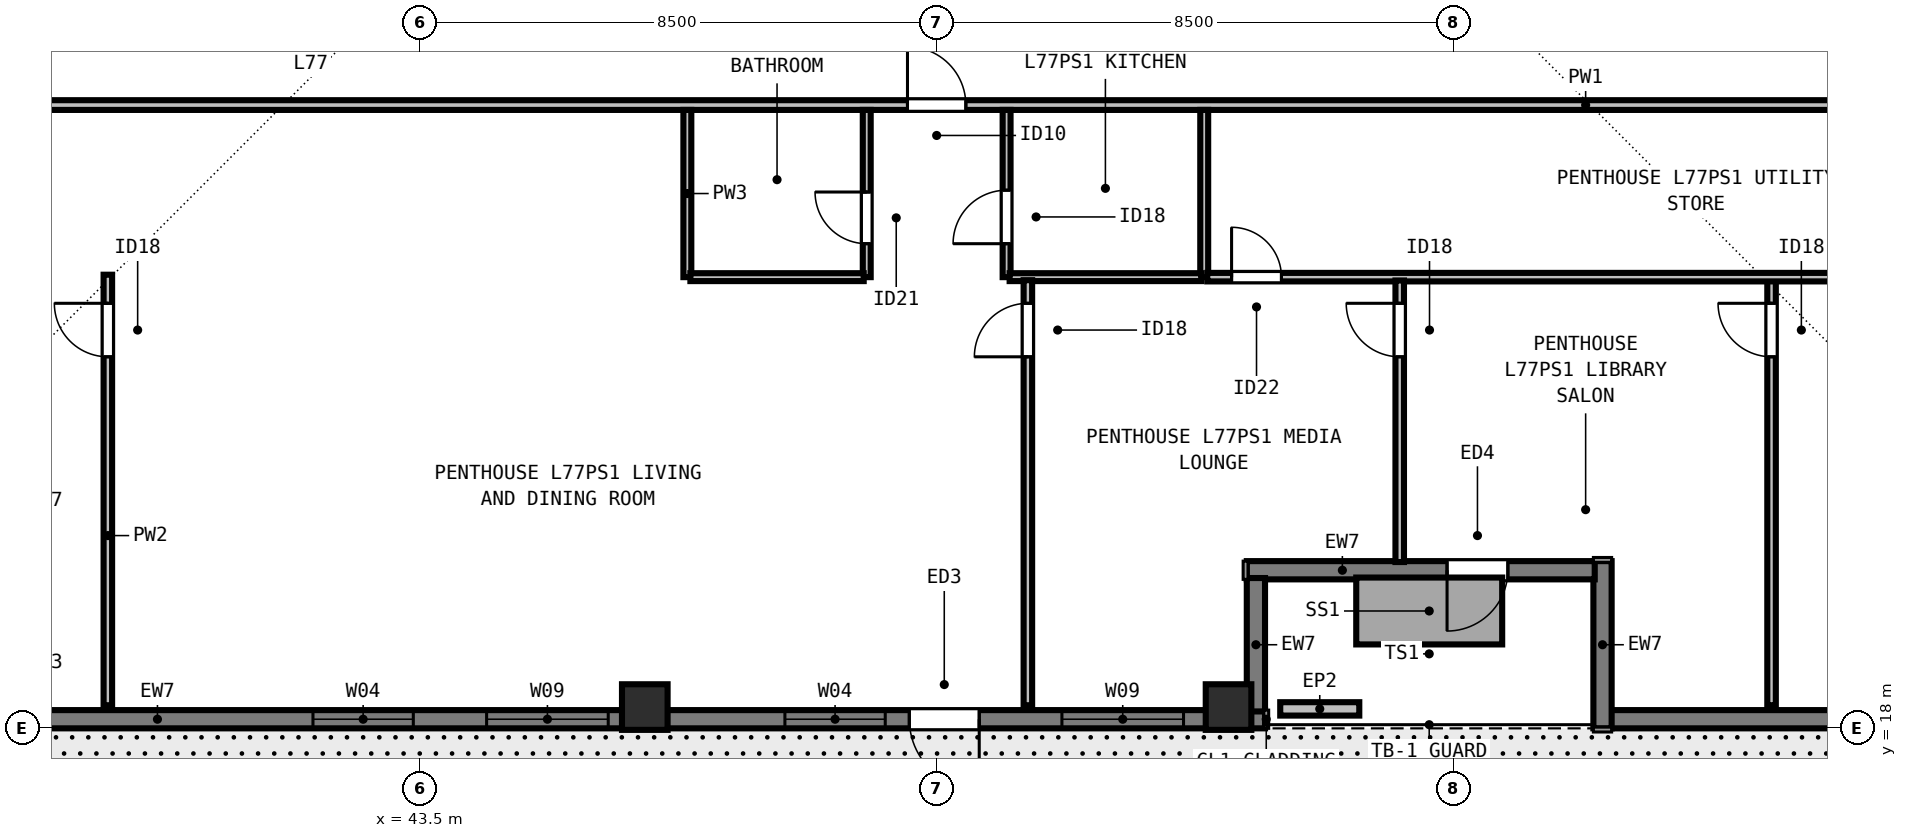
"""IFC4 building model, lengths in metres.
Left out: names, types, materials, properties, quantities, classifications, styles, units other than length and angle.
Written with IfcOpenShell. Run it as: python <this file> out.ifc"""

import sys

from ifc_helpers import new_model, si_unit, direction, frame, frame_2d, origin, origin_2d, place, context, subcontext, project, spatial, rectangle, extrude, element, fill, save


model = new_model("IFC4")
c1 = context("Model", 3, precision=1e-05, world=origin(), true_north=direction((0.0, 1.0)))
c2 = subcontext(c1, "Body", "Model", "MODEL_VIEW")
j1 = project(units=[si_unit("LENGTHUNIT", "METRE"), si_unit("PLANEANGLEUNIT", "RADIAN")], contexts=[c1])
p1 = place(None, origin())
s1 = spatial("IfcSite", under=j1, at=p1, CompositionType="ELEMENT")
p2 = place(p1, origin())
s2 = spatial("IfcBuilding", under=s1, at=p2, CompositionType="ELEMENT")
p3 = place(p2, frame((0.0, 0.0, 280.5)))
s3 = spatial("IfcBuildingStorey", under=s2, at=p3, CompositionType="ELEMENT", Elevation=280.5)
for number, where, z_axis, x_axis in (
    (1, (47.2, 18.35, 0.0), (0.0, 0.0, 1.0), (1.0, 0.0, 0.0)),
    (2, (56.8, 18.35, 0.0), (0.0, 0.0, 1.0), (1.0, 0.0, 0.0)),
):
    element("IfcColumn", number, at=place(p3, frame(where, z_axis=z_axis, x_axis=x_axis)), inside=s3, PredefinedType="COLUMN", context=c2, shape_type="SweptSolid", body=[
        extrude(rectangle(XDim=0.75, YDim=0.75, at=origin_2d()), origin(), (0.0, 0.0, 1.0), 3.5),
    ])
p4 = place(p3, frame((57.4, 18.15, 0.0), z_axis=(0.0, 0.0, 1.0), x_axis=(-1.0, 0.0, 0.0)))
e3 = element("IfcWall", 3, at=p4, inside=s3, PredefinedType="SOLIDWALL", context=c2, shape_type="SweptSolid", body=[
    extrude(rectangle(XDim=20.622, YDim=0.3, at=frame_2d((10.311, 0.0))), origin(), (0.0, 0.0, 1.0), 3.29),
])
p5 = place(p4, frame((1.34, 0.0, 0.8)))
e4 = element("IfcOpeningElement", 4, at=p5, cuts=e3, PredefinedType="OPENING", context=c2, shape_type="SweptSolid", body=[
    extrude(rectangle(XDim=2.0, YDim=1.758, at=frame_2d((1.0, 0.879))), frame((0.0, 0.16, 0.0), z_axis=(0.0, -1.0, 0.0), x_axis=(1.0, 0.0, 0.0)), (0.0, 0.0, 1.0), 0.32),
])
p6 = place(p4, frame((6.246, 0.0, 0.8)))
e5 = element("IfcOpeningElement", 5, at=p6, cuts=e3, PredefinedType="OPENING", context=c2, shape_type="SweptSolid", body=[
    extrude(rectangle(XDim=1.65, YDim=1.758, at=frame_2d((0.825, 0.879))), frame((0.0, 0.16, 0.0), z_axis=(0.0, -1.0, 0.0), x_axis=(1.0, 0.0, 0.0)), (0.0, 0.0, 1.0), 0.32),
])
p7 = place(p4, frame((10.801, 0.0, 0.8)))
e6 = element("IfcOpeningElement", 6, at=p7, cuts=e3, PredefinedType="OPENING", context=c2, shape_type="SweptSolid", body=[
    extrude(rectangle(XDim=2.0, YDim=1.758, at=frame_2d((1.0, 0.879))), frame((0.0, 0.16, 0.0), z_axis=(0.0, -1.0, 0.0), x_axis=(1.0, 0.0, 0.0)), (0.0, 0.0, 1.0), 0.32),
])
p8 = place(p4, frame((14.007, 0.0, 0.8)))
e7 = element("IfcOpeningElement", 7, at=p8, cuts=e3, PredefinedType="OPENING", context=c2, shape_type="SweptSolid", body=[
    extrude(rectangle(XDim=1.65, YDim=1.758, at=frame_2d((0.825, 0.879))), frame((0.0, 0.16, 0.0), z_axis=(0.0, -1.0, 0.0), x_axis=(1.0, 0.0, 0.0)), (0.0, 0.0, 1.0), 0.32),
])
p9 = place(p4, frame((4.7, 0.0, 0.0)))
e8 = element("IfcOpeningElement", 8, at=p9, cuts=e3, PredefinedType="OPENING", context=c2, shape_type="SweptSolid", body=[
    extrude(rectangle(XDim=1.15, YDim=2.15, at=frame_2d((0.575, 1.075))), frame((0.0, 0.16, 0.0), z_axis=(0.0, -1.0, 0.0), x_axis=(1.0, 0.0, 0.0)), (0.0, 0.0, 1.0), 0.32),
])
p10 = place(p3, frame((67.5, 18.15, 0.0), z_axis=(0.0, 0.0, 1.0), x_axis=(-1.0, 0.0, 0.0)))
e9 = element("IfcWall", 9, at=p10, inside=s3, PredefinedType="SOLIDWALL", context=c2, shape_type="SweptSolid", body=[
    extrude(rectangle(XDim=4.422, YDim=0.3, at=frame_2d((2.211, 0.0))), origin(), (0.0, 0.0, 1.0), 3.29),
])
p11 = place(p3, frame((62.95, 18.0, 0.0), z_axis=(0.0, 0.0, 1.0), x_axis=(0.0, 1.0, 0.0)))
e10 = element("IfcWall", 10, at=p11, inside=s3, PredefinedType="SOLIDWALL", context=c2, shape_type="SweptSolid", body=[
    extrude(rectangle(XDim=2.75, YDim=0.3, at=frame_2d((1.375, 0.0))), origin(), (0.0, 0.0, 1.0), 3.29),
])
p12 = place(p3, frame((62.822, 20.6, 0.0), z_axis=(0.0, 0.0, 1.0), x_axis=(-1.0, 0.0, 0.0)))
e11 = element("IfcWall", 11, at=p12, inside=s3, PredefinedType="SOLIDWALL", context=c2, shape_type="SweptSolid", body=[
    extrude(rectangle(XDim=5.722, YDim=0.3, at=frame_2d((2.861, 0.0))), origin(), (0.0, 0.0, 1.0), 3.29),
])
p13 = place(p12, frame((1.428, 0.0, 0.0)))
e12 = element("IfcOpeningElement", 12, at=p13, cuts=e11, PredefinedType="OPENING", context=c2, shape_type="SweptSolid", body=[
    extrude(rectangle(XDim=1.0, YDim=2.15, at=frame_2d((0.5, 1.075))), frame((0.0, 0.16, 0.0), z_axis=(0.0, -1.0, 0.0), x_axis=(1.0, 0.0, 0.0)), (0.0, 0.0, 1.0), 0.32),
])
p14 = place(p3, frame((57.25, 20.472, 0.0), z_axis=(0.0, 0.0, 1.0), x_axis=(0.0, -1.0, 0.0)))
e13 = element("IfcWall", 13, at=p14, inside=s3, PredefinedType="SOLIDWALL", context=c2, shape_type="SweptSolid", body=[
    extrude(rectangle(XDim=2.194, YDim=0.3, at=frame_2d((1.097, 0.0))), origin(), (0.0, 0.0, 1.0), 3.29),
])
p15 = place(p3, frame((57.65, 18.32, 0.0), z_axis=(0.0, 0.0, 1.0), x_axis=(1.0, 0.0, 0.0)))
e14 = element("IfcWall", 14, at=p15, inside=s3, PredefinedType="PARAPET", context=c2, shape_type="SweptSolid", body=[
    extrude(rectangle(XDim=1.3, YDim=0.22, at=frame_2d((0.65, 0.0))), origin(), (0.0, 0.0, 1.0), 0.55),
])
p16 = place(p3, frame((31.285, 28.25, 0.0), z_axis=(0.0, 0.0, 1.0), x_axis=(1.0, 0.0, 0.0)))
e15 = element("IfcWall", 15, at=p16, inside=s3, PredefinedType="PARTITIONING", context=c2, shape_type="SweptSolid", body=[
    extrude(rectangle(XDim=41.43, YDim=0.16, at=frame_2d((20.715, 0.0))), origin(), (0.0, 0.0, 1.0), 3.009),
])
p17 = place(p16, frame((20.235, 0.0, 0.0)))
e16 = element("IfcOpeningElement", 16, at=p17, cuts=e15, PredefinedType="OPENING", context=c2, shape_type="SweptSolid", body=[
    extrude(rectangle(XDim=0.96, YDim=2.18, at=frame_2d((0.48, 1.09))), frame((0.0, 0.09, 0.0), z_axis=(0.0, -1.0, 0.0), x_axis=(1.0, 0.0, 0.0)), (0.0, 0.0, 1.0), 0.18),
])
p18 = place(p3, frame((47.9, 25.42, 0.0), z_axis=(0.0, 0.0, 1.0), x_axis=(0.0, 1.0, 0.0)))
e17 = element("IfcWall", 17, at=p18, inside=s3, PredefinedType="PLUMBINGWALL", context=c2, shape_type="SweptSolid", body=[
    extrude(rectangle(XDim=2.75, YDim=0.13, at=frame_2d((1.375, 0.0))), origin(), (0.0, 0.0, 1.0), 3.29),
])
p19 = place(p3, frame((50.85, 25.42, 0.0), z_axis=(0.0, 0.0, 1.0), x_axis=(0.0, 1.0, 0.0)))
e18 = element("IfcWall", 18, at=p19, inside=s3, PredefinedType="PLUMBINGWALL", context=c2, shape_type="SweptSolid", body=[
    extrude(rectangle(XDim=2.75, YDim=0.13, at=frame_2d((1.375, 0.0))), origin(), (0.0, 0.0, 1.0), 3.29),
])
p20 = place(p19, frame((0.55, 0.0, 0.0)))
e19 = element("IfcOpeningElement", 19, at=p20, cuts=e18, PredefinedType="OPENING", context=c2, shape_type="SweptSolid", body=[
    extrude(rectangle(XDim=0.85, YDim=2.08, at=frame_2d((0.425, 1.04))), frame((0.0, 0.075, 0.0), z_axis=(0.0, -1.0, 0.0), x_axis=(1.0, 0.0, 0.0)), (0.0, 0.0, 1.0), 0.15),
])
p21 = place(p3, frame((47.95, 25.42, 0.0), z_axis=(0.0, 0.0, 1.0), x_axis=(1.0, 0.0, 0.0)))
e20 = element("IfcWall", 20, at=p21, inside=s3, PredefinedType="PLUMBINGWALL", context=c2, shape_type="SweptSolid", body=[
    extrude(rectangle(XDim=2.85, YDim=0.13, at=frame_2d((1.425, 0.0))), origin(), (0.0, 0.0, 1.0), 3.29),
])
p22 = place(p3, frame((56.4, 25.42, 0.0), z_axis=(0.0, 0.0, 1.0), x_axis=(0.0, 1.0, 0.0)))
e21 = element("IfcWall", 21, at=p22, inside=s3, PredefinedType="PLUMBINGWALL", context=c2, shape_type="SweptSolid", body=[
    extrude(rectangle(XDim=2.75, YDim=0.13, at=frame_2d((1.375, 0.0))), origin(), (0.0, 0.0, 1.0), 3.29),
])
p23 = place(p3, frame((53.15, 25.42, 0.0), z_axis=(0.0, 0.0, 1.0), x_axis=(0.0, 1.0, 0.0)))
e22 = element("IfcWall", 22, at=p23, inside=s3, PredefinedType="PLUMBINGWALL", context=c2, shape_type="SweptSolid", body=[
    extrude(rectangle(XDim=2.75, YDim=0.13, at=frame_2d((1.375, 0.0))), origin(), (0.0, 0.0, 1.0), 3.009),
])
p24 = place(p23, frame((0.55, 0.0, 0.0)))
e23 = element("IfcOpeningElement", 23, at=p24, cuts=e22, PredefinedType="OPENING", context=c2, shape_type="SweptSolid", body=[
    extrude(rectangle(XDim=0.88, YDim=2.1, at=frame_2d((0.44, 1.05))), frame((0.0, 0.075, 0.0), z_axis=(0.0, -1.0, 0.0), x_axis=(1.0, 0.0, 0.0)), (0.0, 0.0, 1.0), 0.15),
])
p25 = place(p3, frame((53.2, 25.42, 0.0), z_axis=(0.0, 0.0, 1.0), x_axis=(1.0, 0.0, 0.0)))
e24 = element("IfcWall", 24, at=p25, inside=s3, PredefinedType="PLUMBINGWALL", context=c2, shape_type="SweptSolid", body=[
    extrude(rectangle(XDim=3.15, YDim=0.13, at=frame_2d((1.575, 0.0))), origin(), (0.0, 0.0, 1.0), 3.29),
])
p26 = place(p3, frame((38.37, 18.38, 0.0), z_axis=(0.0, 0.0, 1.0), x_axis=(0.0, 1.0, 0.0)))
e25 = element("IfcWall", 25, at=p26, inside=s3, PredefinedType="PARTITIONING", context=c2, shape_type="SweptSolid", body=[
    extrude(rectangle(XDim=7.08, YDim=0.14, at=frame_2d((3.54, 0.0))), origin(), (0.0, 0.0, 1.0), 2.653),
])
p27 = place(p26, frame((5.73, 0.0, 0.0)))
e26 = element("IfcOpeningElement", 26, at=p27, cuts=e25, PredefinedType="OPENING", context=c2, shape_type="SweptSolid", body=[
    extrude(rectangle(XDim=0.88, YDim=2.1, at=frame_2d((0.44, 1.05))), frame((0.0, 0.08, 0.0), z_axis=(0.0, -1.0, 0.0), x_axis=(1.0, 0.0, 0.0)), (0.0, 0.0, 1.0), 0.16),
])
p28 = place(p3, frame((65.73, 18.38, 0.0), z_axis=(0.0, 0.0, 1.0), x_axis=(0.0, 1.0, 0.0)))
e27 = element("IfcWall", 27, at=p28, inside=s3, PredefinedType="PARTITIONING", context=c2, shape_type="SweptSolid", body=[
    extrude(rectangle(XDim=7.08, YDim=0.14, at=frame_2d((3.54, 0.0))), origin(), (0.0, 0.0, 1.0), 2.653),
])
p29 = place(p28, frame((5.73, 0.0, 0.0)))
e28 = element("IfcOpeningElement", 28, at=p29, cuts=e27, PredefinedType="OPENING", context=c2, shape_type="SweptSolid", body=[
    extrude(rectangle(XDim=0.88, YDim=2.1, at=frame_2d((0.44, 1.05))), frame((0.0, 0.08, 0.0), z_axis=(0.0, -1.0, 0.0), x_axis=(1.0, 0.0, 0.0)), (0.0, 0.0, 1.0), 0.16),
])
p30 = place(p3, frame((56.45, 25.42, 0.0), z_axis=(0.0, 0.0, 1.0), x_axis=(1.0, 0.0, 0.0)))
e29 = element("IfcWall", 29, at=p30, inside=s3, PredefinedType="PARTITIONING", context=c2, shape_type="SweptSolid", body=[
    extrude(rectangle(XDim=16.18, YDim=0.14, at=frame_2d((8.09, 0.0))), origin(), (0.0, 0.0, 1.0), 3.009),
])
p31 = place(p30, frame((0.4, 0.0, 0.0)))
e30 = element("IfcOpeningElement", 30, at=p31, cuts=e29, PredefinedType="OPENING", context=c2, shape_type="SweptSolid", body=[
    extrude(rectangle(XDim=0.82, YDim=2.1, at=frame_2d((0.41, 1.05))), frame((0.0, 0.08, 0.0), z_axis=(0.0, -1.0, 0.0), x_axis=(1.0, 0.0, 0.0)), (0.0, 0.0, 1.0), 0.16),
])
p32 = place(p3, frame((53.5, 18.38, 0.0), z_axis=(0.0, 0.0, 1.0), x_axis=(0.0, 1.0, 0.0)))
e31 = element("IfcWall", 31, at=p32, inside=s3, PredefinedType="PARTITIONING", context=c2, shape_type="SweptSolid", body=[
    extrude(rectangle(XDim=6.99, YDim=0.14, at=frame_2d((3.495, 0.0))), origin(), (0.0, 0.0, 1.0), 3.29),
])
p33 = place(p32, frame((5.73, 0.0, 0.0)))
e32 = element("IfcOpeningElement", 32, at=p33, cuts=e31, PredefinedType="OPENING", context=c2, shape_type="SweptSolid", body=[
    extrude(rectangle(XDim=0.88, YDim=2.1, at=frame_2d((0.44, 1.05))), frame((0.0, 0.08, 0.0), z_axis=(0.0, -1.0, 0.0), x_axis=(1.0, 0.0, 0.0)), (0.0, 0.0, 1.0), 0.16),
])
p34 = place(p3, frame((59.615, 20.735, 0.0), z_axis=(0.0, 0.0, 1.0), x_axis=(0.0, 1.0, 0.0)))
e33 = element("IfcWall", 33, at=p34, inside=s3, PredefinedType="PARTITIONING", context=c2, shape_type="SweptSolid", body=[
    extrude(rectangle(XDim=4.63, YDim=0.14, at=frame_2d((2.315, 0.0))), origin(), (0.0, 0.0, 1.0), 3.29),
])
p35 = place(p34, frame((3.375, 0.0, 0.0)))
e34 = element("IfcOpeningElement", 34, at=p35, cuts=e33, PredefinedType="OPENING", context=c2, shape_type="SweptSolid", body=[
    extrude(rectangle(XDim=0.88, YDim=2.1, at=frame_2d((0.44, 1.05))), frame((0.0, 0.08, 0.0), z_axis=(0.0, -1.0, 0.0), x_axis=(1.0, 0.0, 0.0)), (0.0, 0.0, 1.0), 0.16),
])
p36 = place(p5, origin())
e35 = element("IfcWindow", 35, at=p36, inside=s3, PartitioningType="SINGLE_PANEL", PredefinedType="WINDOW", context=c2, shape_type="SweptSolid", body=[
    extrude(rectangle(XDim=2.0, YDim=1.758, at=frame_2d((1.0, 0.879))), frame((0.0, -0.05, 0.0), z_axis=(0.0, -1.0, 0.0), x_axis=(1.0, 0.0, 0.0)), (0.0, 0.0, 1.0), 0.06),
])
fill(e4, e35)
p37 = place(p6, origin())
e36 = element("IfcWindow", 36, at=p37, inside=s3, PartitioningType="SINGLE_PANEL", PredefinedType="WINDOW", context=c2, shape_type="SweptSolid", body=[
    extrude(rectangle(XDim=1.65, YDim=1.758, at=frame_2d((0.825, 0.879))), frame((0.0, -0.05, 0.0), z_axis=(0.0, -1.0, 0.0), x_axis=(1.0, 0.0, 0.0)), (0.0, 0.0, 1.0), 0.06),
])
fill(e5, e36)
p38 = place(p7, origin())
e37 = element("IfcWindow", 37, at=p38, inside=s3, PartitioningType="SINGLE_PANEL", PredefinedType="WINDOW", context=c2, shape_type="SweptSolid", body=[
    extrude(rectangle(XDim=2.0, YDim=1.758, at=frame_2d((1.0, 0.879))), frame((0.0, -0.05, 0.0), z_axis=(0.0, -1.0, 0.0), x_axis=(1.0, 0.0, 0.0)), (0.0, 0.0, 1.0), 0.06),
])
fill(e6, e37)
p39 = place(p8, origin())
e38 = element("IfcWindow", 38, at=p39, inside=s3, PartitioningType="SINGLE_PANEL", PredefinedType="WINDOW", context=c2, shape_type="SweptSolid", body=[
    extrude(rectangle(XDim=1.65, YDim=1.758, at=frame_2d((0.825, 0.879))), frame((0.0, -0.05, 0.0), z_axis=(0.0, -1.0, 0.0), x_axis=(1.0, 0.0, 0.0)), (0.0, 0.0, 1.0), 0.06),
])
fill(e7, e38)
p40 = place(p13, origin())
e39 = element("IfcDoor", 39, at=p40, inside=s3, OperationType="SINGLE_SWING_RIGHT", PredefinedType="DOOR", context=c2, shape_type="SweptSolid", body=[
    extrude(rectangle(XDim=1.0, YDim=2.15, at=frame_2d((0.5, 1.075))), frame((0.0, 0.025, 0.0), z_axis=(0.0, -1.0, 0.0), x_axis=(1.0, 0.0, 0.0)), (0.0, 0.0, 1.0), 0.05),
])
fill(e12, e39)
p41 = place(p9, origin())
e40 = element("IfcDoor", 40, at=p41, inside=s3, OperationType="SINGLE_SWING_LEFT", PredefinedType="DOOR", context=c2, shape_type="SweptSolid", body=[
    extrude(rectangle(XDim=1.15, YDim=2.15, at=frame_2d((0.575, 1.075))), frame((0.0, 0.025, 0.0), z_axis=(0.0, -1.0, 0.0), x_axis=(1.0, 0.0, 0.0)), (0.0, 0.0, 1.0), 0.05),
])
fill(e8, e40)
p42 = place(p20, origin())
e41 = element("IfcDoor", 41, at=p42, inside=s3, OperationType="SINGLE_SWING_RIGHT", PredefinedType="DOOR", context=c2, shape_type="SweptSolid", body=[
    extrude(rectangle(XDim=0.85, YDim=2.08, at=frame_2d((0.425, 1.04))), frame((0.0, 0.025, 0.0), z_axis=(0.0, -1.0, 0.0), x_axis=(1.0, 0.0, 0.0)), (0.0, 0.0, 1.0), 0.05),
])
fill(e19, e41)
p43 = place(p24, origin())
e42 = element("IfcDoor", 42, at=p43, inside=s3, OperationType="SINGLE_SWING_LEFT", PredefinedType="DOOR", context=c2, shape_type="SweptSolid", body=[
    extrude(rectangle(XDim=0.88, YDim=2.1, at=frame_2d((0.44, 1.05))), frame((0.0, 0.025, 0.0), z_axis=(0.0, -1.0, 0.0), x_axis=(1.0, 0.0, 0.0)), (0.0, 0.0, 1.0), 0.05),
])
fill(e23, e42)
p44 = place(p27, origin())
e43 = element("IfcDoor", 43, at=p44, inside=s3, OperationType="SINGLE_SWING_RIGHT", PredefinedType="DOOR", context=c2, shape_type="SweptSolid", body=[
    extrude(rectangle(XDim=0.88, YDim=2.1, at=frame_2d((0.44, 1.05))), frame((0.0, 0.025, 0.0), z_axis=(0.0, -1.0, 0.0), x_axis=(1.0, 0.0, 0.0)), (0.0, 0.0, 1.0), 0.05),
])
fill(e26, e43)
p45 = place(p31, origin())
e44 = element("IfcDoor", 44, at=p45, inside=s3, OperationType="SINGLE_SWING_LEFT", PredefinedType="DOOR", context=c2, shape_type="SweptSolid", body=[
    extrude(rectangle(XDim=0.82, YDim=2.1, at=frame_2d((0.41, 1.05))), frame((0.0, 0.025, 0.0), z_axis=(0.0, -1.0, 0.0), x_axis=(1.0, 0.0, 0.0)), (0.0, 0.0, 1.0), 0.05),
])
fill(e30, e44)
p46 = place(p29, origin())
e45 = element("IfcDoor", 45, at=p46, inside=s3, OperationType="SINGLE_SWING_RIGHT", PredefinedType="DOOR", context=c2, shape_type="SweptSolid", body=[
    extrude(rectangle(XDim=0.88, YDim=2.1, at=frame_2d((0.44, 1.05))), frame((0.0, 0.025, 0.0), z_axis=(0.0, -1.0, 0.0), x_axis=(1.0, 0.0, 0.0)), (0.0, 0.0, 1.0), 0.05),
])
fill(e28, e45)
p47 = place(p33, origin())
e46 = element("IfcDoor", 46, at=p47, inside=s3, OperationType="SINGLE_SWING_LEFT", PredefinedType="DOOR", context=c2, shape_type="SweptSolid", body=[
    extrude(rectangle(XDim=0.88, YDim=2.1, at=frame_2d((0.44, 1.05))), frame((0.0, 0.025, 0.0), z_axis=(0.0, -1.0, 0.0), x_axis=(1.0, 0.0, 0.0)), (0.0, 0.0, 1.0), 0.05),
])
fill(e32, e46)
p48 = place(p35, origin())
e47 = element("IfcDoor", 47, at=p48, inside=s3, OperationType="SINGLE_SWING_RIGHT", PredefinedType="DOOR", context=c2, shape_type="SweptSolid", body=[
    extrude(rectangle(XDim=0.88, YDim=2.1, at=frame_2d((0.44, 1.05))), frame((0.0, 0.025, 0.0), z_axis=(0.0, -1.0, 0.0), x_axis=(1.0, 0.0, 0.0)), (0.0, 0.0, 1.0), 0.05),
])
fill(e34, e47)
p49 = place(p17, origin())
e48 = element("IfcDoor", 48, at=p49, inside=s3, OperationType="SINGLE_SWING_LEFT", PredefinedType="DOOR", context=c2, shape_type="SweptSolid", body=[
    extrude(rectangle(XDim=0.96, YDim=2.18, at=frame_2d((0.48, 1.09))), frame((0.0, 0.025, 0.0), z_axis=(0.0, -1.0, 0.0), x_axis=(1.0, 0.0, 0.0)), (0.0, 0.0, 1.0), 0.05),
])
fill(e16, e48)
save(model, sys.argv[1])
